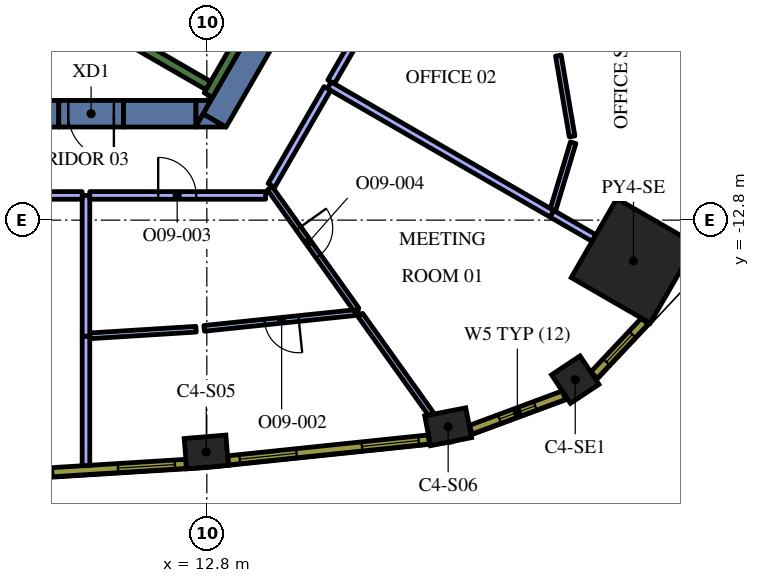
"""IFC4 building model, lengths in metres.
Left out: names, types, materials, properties, quantities, classifications, styles, units other than length and angle.
Written with IfcOpenShell. Run it as: python <this file> out.ifc"""

import sys

from ifc_helpers import new_model, si_unit, direction, frame, frame_2d, origin, origin_2d, place, context, subcontext, project, spatial, polyline, rectangle, outline, extrude, element, fill, save


model = new_model("IFC4")
c1 = context("Model", 3, precision=1e-05, world=origin(), true_north=direction((0.0, 1.0)))
c2 = subcontext(c1, "Body", "Model", "MODEL_VIEW")
j1 = project(units=[si_unit("LENGTHUNIT", "METRE"), si_unit("PLANEANGLEUNIT", "RADIAN")], contexts=[c1])
p1 = place(None, origin())
s1 = spatial("IfcSite", under=j1, at=p1, CompositionType="ELEMENT")
p2 = place(p1, origin())
s2 = spatial("IfcBuilding", under=s1, at=p2, CompositionType="ELEMENT")
p3 = place(p2, frame((0.0, 0.0, 247.8)))
s3 = spatial("IfcBuildingStorey", under=s2, at=p3, CompositionType="ELEMENT", Elevation=247.8)
p4 = place(p3, frame((24.027, -13.872, 0.0), z_axis=(0.0, 0.0, 1.0), x_axis=(0.866025403784, -0.5, 0.0)))
e1 = element("IfcColumn", 1, at=p4, inside=s3, PredefinedType="COLUMN", context=c2, shape_type="SweptSolid", body=[
    extrude(rectangle(XDim=2.4, YDim=2.4, at=origin_2d()), origin(), (0.0, 0.0, 1.0), 4.2),
])
for number, where, z_axis, x_axis in (
    (2, (12.785, -18.9, 0.0), (0.0, 0.0, 1.0), (0.997, 0.083, 0.0)),
    (3, (19.15, -18.237, 0.0), (0.0, 0.0, 1.0), (0.981, 0.192, 0.0)),
):
    element("IfcColumn", number, at=place(p3, frame(where, z_axis=z_axis, x_axis=x_axis)), inside=s3, PredefinedType="COLUMN", context=c2, shape_type="SweptSolid", body=[
        extrude(rectangle(XDim=1.1, YDim=0.8, at=origin_2d()), origin(), (0.0, 0.0, 1.0), 4.2),
    ])
p5 = place(p3, frame((22.494, -16.997, 0.0), z_axis=(0.0, 0.0, 1.0), x_axis=(0.833238868178, 0.552913183563, 0.0)))
e4 = element("IfcColumn", 4, at=p5, inside=s3, PredefinedType="COLUMN", context=c2, shape_type="SweptSolid", body=[
    extrude(rectangle(XDim=0.9, YDim=0.9, at=origin_2d()), origin(), (0.0, 0.0, 1.0), 4.2),
])
p6 = place(p3, frame((13.003, -10.179, 0.0), z_axis=(0.0, 0.0, 1.0), x_axis=(0.499972675833, 0.866041178825, 0.0)))
e5 = element("IfcWall", 5, at=p6, inside=s3, PredefinedType="SOLIDWALL", context=c2, shape_type="SweptSolid", body=[
    extrude(rectangle(XDim=3.829, YDim=0.7, at=frame_2d((1.915, 0.0))), origin(), (0.0, 0.0, 1.0), 4.2),
])
p7 = place(p3, origin())
e6 = element("IfcWall", 6, at=p7, inside=s3, PredefinedType="SOLIDWALL", context=c2, shape_type="SweptSolid", body=[
    extrude(outline(polyline([(12.5, -10.35), (12.698, -10.005), (13.296, -10.35), (12.5, -10.35)])), origin(), (0.0, 0.0, 1.0), 4.2),
])
p8 = place(p3, frame((10.604, -10.0, 0.0), z_axis=(0.0, 0.0, 1.0), x_axis=(1.0, 0.0, 0.0)))
e7 = element("IfcWall", 7, at=p8, inside=s3, PredefinedType="SOLIDWALL", context=c2, shape_type="SweptSolid", body=[
    extrude(rectangle(XDim=1.909, YDim=0.7, at=frame_2d((0.955, 0.0))), origin(), (0.0, 0.0, 1.0), 4.2),
])
e8 = element("IfcWall", 8, at=p7, inside=s3, PredefinedType="SOLIDWALL", context=c2, shape_type="SweptSolid", body=[
    extrude(outline(polyline([(12.904, -9.65), (12.516, -10.322), (12.516, -9.65), (12.904, -9.65)])), origin(), (0.0, 0.0, 1.0), 4.2),
])
p9 = place(p3, frame((8.904, -10.0, 0.0), z_axis=(0.0, 0.0, 1.0), x_axis=(-1.0, 0.0, 0.0)))
e9 = element("IfcWall", 9, at=p9, inside=s3, PredefinedType="SOLIDWALL", context=c2, shape_type="SweptSolid", body=[
    extrude(rectangle(XDim=22.226, YDim=0.7, at=frame_2d((11.113, 0.0))), origin(), (0.0, 0.0, 1.0), 4.2),
])
p10 = place(p3, frame((12.84, -9.511, 0.0), z_axis=(0.0, 0.0, 1.0), x_axis=(0.500048121057, 0.865997619297, 0.0)))
e10 = element("IfcWall", 10, at=p10, inside=s3, PredefinedType="SOLIDWALL", context=c2, shape_type="SweptSolid", body=[
    extrude(rectangle(XDim=3.634, YDim=0.25, at=frame_2d((1.817, 0.0))), origin(), (0.0, 0.0, 1.0), 4.2),
])
p11 = place(p3, frame((12.84, -9.261, 0.0), z_axis=(0.0, 0.0, 1.0), x_axis=(-0.866013990052, 0.500019768644, 0.0)))
e11 = element("IfcWall", 11, at=p11, inside=s3, PredefinedType="SOLIDWALL", context=c2, shape_type="SweptSolid", body=[
    extrude(rectangle(XDim=6.8, YDim=0.25, at=frame_2d((3.4, 0.0))), origin(), (0.0, 0.0, 1.0), 4.2),
])
p12 = place(p3, frame((10.604, -10.0, 0.0), z_axis=(0.0, 0.0, 1.0), x_axis=(-1.0, 0.0, 0.0)))
e12 = element("IfcWall", 12, at=p12, inside=s3, PredefinedType="SOLIDWALL", context=c2, shape_type="SweptSolid", body=[
    extrude(rectangle(XDim=1.7, YDim=0.7, at=frame_2d((0.85, 0.0))), origin(), (0.0, 0.0, 1.0), 4.2),
])
p13 = place(p12, frame((0.25, 0.0, 0.0)))
e13 = element("IfcOpeningElement", 13, at=p13, cuts=e12, PredefinedType="OPENING", context=c2, shape_type="SweptSolid", body=[
    extrude(rectangle(XDim=1.2, YDim=2.1, at=frame_2d((0.6, 1.05))), frame((0.0, 0.36, 0.0), z_axis=(0.0, -1.0, 0.0), x_axis=(1.0, 0.0, 0.0)), (0.0, 0.0, 1.0), 0.72),
])
p14 = place(p3, frame((9.62, -15.847, 0.0), z_axis=(0.0, 0.0, 1.0), x_axis=(0.0, -1.0, 0.0)))
e14 = element("IfcWall", 14, at=p14, inside=s3, PredefinedType="PARTITIONING", context=c2, shape_type="SweptSolid", body=[
    extrude(rectangle(XDim=3.411, YDim=0.2, at=frame_2d((1.705, 0.0))), origin(), (0.0, 0.0, 1.0), 3.45),
])
p15 = place(p3, frame((9.62, -12.15, 0.0), z_axis=(0.0, 0.0, 1.0), x_axis=(0.0, -1.0, 0.0)))
e15 = element("IfcWall", 15, at=p15, inside=s3, PredefinedType="PARTITIONING", context=c2, shape_type="SweptSolid", body=[
    extrude(rectangle(XDim=3.705, YDim=0.2, at=frame_2d((1.853, 0.0))), origin(), (0.0, 0.0, 1.0), 3.45),
])
p16 = place(p3, frame((7.03, -12.15, 0.0), z_axis=(0.0, 0.0, 1.0), x_axis=(1.0, 0.0, 0.0)))
e16 = element("IfcWall", 16, at=p16, inside=s3, PredefinedType="PARTITIONING", context=c2, shape_type="SweptSolid", body=[
    extrude(rectangle(XDim=2.49, YDim=0.2, at=frame_2d((1.245, 0.0))), origin(), (0.0, 0.0, 1.0), 3.45),
])
p17 = place(p3, frame((9.72, -15.844, 0.0), z_axis=(0.0, 0.0, 1.0), x_axis=(0.998063411199, 0.062204720286, 0.0)))
e17 = element("IfcWall", 17, at=p17, inside=s3, PredefinedType="PARTITIONING", context=c2, shape_type="SweptSolid", body=[
    extrude(rectangle(XDim=2.802, YDim=0.15, at=frame_2d((1.401, 0.0))), origin(), (0.0, 0.0, 1.0), 3.45),
])
p18 = place(p3, frame((16.788, -15.225, 0.0), z_axis=(0.0, 0.0, 1.0), x_axis=(-0.994622518406, -0.103566625322, 0.0)))
e18 = element("IfcWall", 18, at=p18, inside=s3, PredefinedType="PARTITIONING", context=c2, shape_type="SweptSolid", body=[
    extrude(rectangle(XDim=4.081, YDim=0.15, at=frame_2d((2.04, 0.0))), origin(), (0.0, 0.0, 1.0), 3.45),
])
p19 = place(p18, frame((1.581, 0.0, 0.0)))
e19 = element("IfcOpeningElement", 19, at=p19, cuts=e18, PredefinedType="OPENING", context=c2, shape_type="SweptSolid", body=[
    extrude(rectangle(XDim=0.9, YDim=2.1, at=frame_2d((0.45, 1.05))), frame((0.0, 0.085, 0.0), z_axis=(0.0, -1.0, 0.0), x_axis=(1.0, 0.0, 0.0)), (0.0, 0.0, 1.0), 0.17),
])
p20 = place(p3, frame((16.838, -15.295, 0.0), z_axis=(0.0, 0.0, 1.0), x_axis=(0.581015803238, -0.813892275666, 0.0)))
e20 = element("IfcWall", 20, at=p20, inside=s3, PredefinedType="PARTITIONING", context=c2, shape_type="SweptSolid", body=[
    extrude(rectangle(XDim=3.219, YDim=0.15, at=frame_2d((1.61, 0.0))), origin(), (0.0, 0.0, 1.0), 3.45),
])
p21 = place(p3, frame((14.457, -11.96, 0.0), z_axis=(0.0, 0.0, 1.0), x_axis=(0.581049944662, -0.81386790194, 0.0)))
e21 = element("IfcWall", 21, at=p21, inside=s3, PredefinedType="PARTITIONING", context=c2, shape_type="SweptSolid", body=[
    extrude(rectangle(XDim=3.926, YDim=0.15, at=frame_2d((1.963, 0.0))), origin(), (0.0, 0.0, 1.0), 3.45),
])
p22 = place(p21, frame((1.3, 0.0, 0.0)))
e22 = element("IfcOpeningElement", 22, at=p22, cuts=e21, PredefinedType="OPENING", context=c2, shape_type="SweptSolid", body=[
    extrude(rectangle(XDim=0.9, YDim=2.1, at=frame_2d((0.45, 1.05))), frame((0.0, 0.085, 0.0), z_axis=(0.0, -1.0, 0.0), x_axis=(1.0, 0.0, 0.0)), (0.0, 0.0, 1.0), 0.17),
])
p23 = place(p3, frame((9.72, -12.15, 0.0), z_axis=(0.0, 0.0, 1.0), x_axis=(1.0, 0.0, 0.0)))
e23 = element("IfcWall", 23, at=p23, inside=s3, PredefinedType="PARTITIONING", context=c2, shape_type="SweptSolid", body=[
    extrude(rectangle(XDim=4.627, YDim=0.2, at=frame_2d((2.314, 0.0))), origin(), (0.0, 0.0, 1.0), 3.45),
])
p24 = place(p23, frame((1.8, 0.0, 0.0)))
e24 = element("IfcOpeningElement", 24, at=p24, cuts=e23, PredefinedType="OPENING", context=c2, shape_type="SweptSolid", body=[
    extrude(rectangle(XDim=1.0, YDim=2.1, at=frame_2d((0.5, 1.05))), frame((0.0, 0.11, 0.0), z_axis=(0.0, -1.0, 0.0), x_axis=(1.0, 0.0, 0.0)), (0.0, 0.0, 1.0), 0.22),
])
p25 = place(p3, frame((21.873, -12.628, 0.0), z_axis=(0.0, 0.0, 1.0), x_axis=(0.866052988967, -0.499952218018, 0.0)))
e25 = element("IfcWall", 25, at=p25, inside=s3, PredefinedType="PARTITIONING", context=c2, shape_type="SweptSolid", body=[
    extrude(rectangle(XDim=1.288, YDim=0.2, at=frame_2d((0.644, 0.0))), origin(), (0.0, 0.0, 1.0), 3.45),
])
p26 = place(p3, frame((16.021, -9.25, 0.0), z_axis=(0.0, 0.0, 1.0), x_axis=(0.86602692059, -0.499997372806, 0.0)))
e26 = element("IfcWall", 26, at=p26, inside=s3, PredefinedType="PARTITIONING", context=c2, shape_type="SweptSolid", body=[
    extrude(rectangle(XDim=6.765, YDim=0.2, at=frame_2d((3.382, 0.0))), origin(), (0.0, 0.0, 1.0), 3.45),
])
p27 = place(p3, frame((14.498, -11.888, 0.0), z_axis=(0.0, 0.0, 1.0), x_axis=(0.500006981563, 0.86602137294, 0.0)))
e27 = element("IfcWall", 27, at=p27, inside=s3, PredefinedType="PARTITIONING", context=c2, shape_type="SweptSolid", body=[
    extrude(rectangle(XDim=2.946, YDim=0.2, at=frame_2d((1.473, 0.0))), origin(), (0.0, 0.0, 1.0), 3.45),
])
p28 = place(p3, frame((21.906, -12.532, 0.0), z_axis=(0.0, 0.0, 1.0), x_axis=(0.288789848591, 0.957392512688, 0.0)))
e28 = element("IfcWall", 28, at=p28, inside=s3, PredefinedType="PARTITIONING", context=c2, shape_type="SweptSolid", body=[
    extrude(rectangle(XDim=1.848, YDim=0.15, at=frame_2d((0.924, 0.0))), origin(), (0.0, 0.0, 1.0), 3.45),
])
p29 = place(p3, frame((22.412, -10.597, 0.0), z_axis=(0.0, 0.0, 1.0), x_axis=(-0.167612004459, 0.985853039738, 0.0)))
e29 = element("IfcWall", 29, at=p29, inside=s3, PredefinedType="PARTITIONING", context=c2, shape_type="SweptSolid", body=[
    extrude(rectangle(XDim=2.156, YDim=0.15, at=frame_2d((1.078, 0.0))), origin(), (0.0, 0.0, 1.0), 3.45),
])
p30 = place(p3, frame((16.072, -9.163, 0.0), z_axis=(0.0, 0.0, 1.0), x_axis=(0.500010870188, 0.866019127788, 0.0)))
e30 = element("IfcWall", 30, at=p30, inside=s3, PredefinedType="PARTITIONING", context=c2, shape_type="SweptSolid", body=[
    extrude(rectangle(XDim=3.249, YDim=0.2, at=frame_2d((1.624, 0.0))), origin(), (0.0, 0.0, 1.0), 3.45),
])
p31 = place(p3, frame((6.965, -19.543, 0.0), z_axis=(0.0, 0.0, 1.0), x_axis=(0.9980633213, 0.062206162685, 0.0)))
e31 = element("IfcWall", 31, at=p31, inside=s3, PredefinedType="SOLIDWALL", context=c2, shape_type="SweptSolid", body=[
    extrude(rectangle(XDim=5.298, YDim=0.24, at=frame_2d((2.649, 0.0))), origin(), (0.0, 0.0, 1.0), 3.95),
])
p32 = place(p31, frame((0.295, 0.0, 0.9)))
e32 = element("IfcOpeningElement", 32, at=p32, cuts=e31, PredefinedType="OPENING", context=c2, shape_type="SweptSolid", body=[
    extrude(rectangle(XDim=1.5, YDim=2.55, at=frame_2d((0.75, 1.275))), frame((0.0, 0.13, 0.0), z_axis=(0.0, -1.0, 0.0), x_axis=(1.0, 0.0, 0.0)), (0.0, 0.0, 1.0), 0.26),
])
p33 = place(p31, frame((3.504, 0.0, 0.9)))
e33 = element("IfcOpeningElement", 33, at=p33, cuts=e31, PredefinedType="OPENING", context=c2, shape_type="SweptSolid", body=[
    extrude(rectangle(XDim=1.5, YDim=2.55, at=frame_2d((0.75, 1.275))), frame((0.0, 0.13, 0.0), z_axis=(0.0, -1.0, 0.0), x_axis=(1.0, 0.0, 0.0)), (0.0, 0.0, 1.0), 0.26),
])
p34 = place(p3, frame((13.362, -19.121, 0.0), z_axis=(0.0, 0.0, 1.0), x_axis=(0.994621961215, 0.103571976272, 0.0)))
e34 = element("IfcWall", 34, at=p34, inside=s3, PredefinedType="SOLIDWALL", context=c2, shape_type="SweptSolid", body=[
    extrude(rectangle(XDim=5.311, YDim=0.24, at=frame_2d((2.655, 0.0))), origin(), (0.0, 0.0, 1.0), 3.95),
])
p35 = place(p34, frame((0.306, 0.0, 0.9)))
e35 = element("IfcOpeningElement", 35, at=p35, cuts=e34, PredefinedType="OPENING", context=c2, shape_type="SweptSolid", body=[
    extrude(rectangle(XDim=1.5, YDim=2.55, at=frame_2d((0.75, 1.275))), frame((0.0, 0.13, 0.0), z_axis=(0.0, -1.0, 0.0), x_axis=(1.0, 0.0, 0.0)), (0.0, 0.0, 1.0), 0.26),
])
p36 = place(p34, frame((3.539, 0.0, 0.9)))
e36 = element("IfcOpeningElement", 36, at=p36, cuts=e34, PredefinedType="OPENING", context=c2, shape_type="SweptSolid", body=[
    extrude(rectangle(XDim=1.5, YDim=2.55, at=frame_2d((0.75, 1.275))), frame((0.0, 0.13, 0.0), z_axis=(0.0, -1.0, 0.0), x_axis=(1.0, 0.0, 0.0)), (0.0, 0.0, 1.0), 0.26),
])
p37 = place(p3, frame((19.748, -18.314, 0.0), z_axis=(0.0, 0.0, 1.0), x_axis=(0.937569171184, 0.347798863203, 0.0)))
e37 = element("IfcWall", 37, at=p37, inside=s3, PredefinedType="SOLIDWALL", context=c2, shape_type="SweptSolid", body=[
    extrude(rectangle(XDim=2.609, YDim=0.24, at=frame_2d((1.305, 0.0))), origin(), (0.0, 0.0, 1.0), 3.95),
])
p38 = place(p37, frame((0.805, 0.0, 0.9)))
e38 = element("IfcOpeningElement", 38, at=p38, cuts=e37, PredefinedType="OPENING", context=c2, shape_type="SweptSolid", body=[
    extrude(rectangle(XDim=1.0, YDim=2.55, at=frame_2d((0.5, 1.275))), frame((0.0, 0.13, 0.0), z_axis=(0.0, -1.0, 0.0), x_axis=(1.0, 0.0, 0.0)), (0.0, 0.0, 1.0), 0.26),
])
p39 = place(p3, frame((22.989, -16.879, 0.0), z_axis=(0.0, 0.0, 1.0), x_axis=(0.684770274166, 0.728758994194, 0.0)))
e39 = element("IfcWall", 39, at=p39, inside=s3, PredefinedType="SOLIDWALL", context=c2, shape_type="SweptSolid", body=[
    extrude(rectangle(XDim=1.948, YDim=0.24, at=frame_2d((0.974, 0.0))), origin(), (0.0, 0.0, 1.0), 3.95),
])
p40 = place(p39, frame((0.474, 0.0, 0.9)))
e40 = element("IfcOpeningElement", 40, at=p40, cuts=e39, PredefinedType="OPENING", context=c2, shape_type="SweptSolid", body=[
    extrude(rectangle(XDim=1.0, YDim=2.55, at=frame_2d((0.5, 1.275))), frame((0.0, 0.13, 0.0), z_axis=(0.0, -1.0, 0.0), x_axis=(1.0, 0.0, 0.0)), (0.0, 0.0, 1.0), 0.26),
])
p41 = place(p13, origin())
e41 = element("IfcDoor", 41, at=p41, inside=s3, OperationType="SINGLE_SWING_LEFT", PredefinedType="DOOR", context=c2, shape_type="SweptSolid", body=[
    extrude(rectangle(XDim=1.2, YDim=2.1, at=frame_2d((0.6, 1.05))), frame((0.0, 0.025, 0.0), z_axis=(0.0, -1.0, 0.0), x_axis=(1.0, 0.0, 0.0)), (0.0, 0.0, 1.0), 0.05),
])
fill(e13, e41)
p42 = place(p19, origin())
e42 = element("IfcDoor", 42, at=p42, inside=s3, OperationType="SINGLE_SWING_LEFT", PredefinedType="DOOR", context=c2, shape_type="SweptSolid", body=[
    extrude(rectangle(XDim=0.9, YDim=2.1, at=frame_2d((0.45, 1.05))), frame((0.0, 0.025, 0.0), z_axis=(0.0, -1.0, 0.0), x_axis=(1.0, 0.0, 0.0)), (0.0, 0.0, 1.0), 0.05),
])
fill(e19, e42)
p43 = place(p24, origin())
e43 = element("IfcDoor", 43, at=p43, inside=s3, OperationType="SINGLE_SWING_LEFT", PredefinedType="DOOR", context=c2, shape_type="SweptSolid", body=[
    extrude(rectangle(XDim=1.0, YDim=2.1, at=frame_2d((0.5, 1.05))), frame((0.0, 0.025, 0.0), z_axis=(0.0, -1.0, 0.0), x_axis=(1.0, 0.0, 0.0)), (0.0, 0.0, 1.0), 0.05),
])
fill(e24, e43)
p44 = place(p22, origin())
e44 = element("IfcDoor", 44, at=p44, inside=s3, OperationType="SINGLE_SWING_LEFT", PredefinedType="DOOR", context=c2, shape_type="SweptSolid", body=[
    extrude(rectangle(XDim=0.9, YDim=2.1, at=frame_2d((0.45, 1.05))), frame((0.0, 0.025, 0.0), z_axis=(0.0, -1.0, 0.0), x_axis=(1.0, 0.0, 0.0)), (0.0, 0.0, 1.0), 0.05),
])
fill(e22, e44)
p45 = place(p32, origin())
e45 = element("IfcWindow", 45, at=p45, inside=s3, PartitioningType="SINGLE_PANEL", PredefinedType="WINDOW", context=c2, shape_type="SweptSolid", body=[
    extrude(rectangle(XDim=1.5, YDim=2.55, at=frame_2d((0.75, 1.275))), frame((0.0, 0.04, 0.0), z_axis=(0.0, -1.0, 0.0), x_axis=(1.0, 0.0, 0.0)), (0.0, 0.0, 1.0), 0.06),
])
fill(e32, e45)
p46 = place(p33, origin())
e46 = element("IfcWindow", 46, at=p46, inside=s3, PartitioningType="SINGLE_PANEL", PredefinedType="WINDOW", context=c2, shape_type="SweptSolid", body=[
    extrude(rectangle(XDim=1.5, YDim=2.55, at=frame_2d((0.75, 1.275))), frame((0.0, 0.04, 0.0), z_axis=(0.0, -1.0, 0.0), x_axis=(1.0, 0.0, 0.0)), (0.0, 0.0, 1.0), 0.06),
])
fill(e33, e46)
p47 = place(p35, origin())
e47 = element("IfcWindow", 47, at=p47, inside=s3, PartitioningType="SINGLE_PANEL", PredefinedType="WINDOW", context=c2, shape_type="SweptSolid", body=[
    extrude(rectangle(XDim=1.5, YDim=2.55, at=frame_2d((0.75, 1.275))), frame((0.0, 0.04, 0.0), z_axis=(0.0, -1.0, 0.0), x_axis=(1.0, 0.0, 0.0)), (0.0, 0.0, 1.0), 0.06),
])
fill(e35, e47)
p48 = place(p36, origin())
e48 = element("IfcWindow", 48, at=p48, inside=s3, PartitioningType="SINGLE_PANEL", PredefinedType="WINDOW", context=c2, shape_type="SweptSolid", body=[
    extrude(rectangle(XDim=1.5, YDim=2.55, at=frame_2d((0.75, 1.275))), frame((0.0, 0.04, 0.0), z_axis=(0.0, -1.0, 0.0), x_axis=(1.0, 0.0, 0.0)), (0.0, 0.0, 1.0), 0.06),
])
fill(e36, e48)
p49 = place(p38, origin())
e49 = element("IfcWindow", 49, at=p49, inside=s3, PartitioningType="SINGLE_PANEL", PredefinedType="WINDOW", context=c2, shape_type="SweptSolid", body=[
    extrude(rectangle(XDim=1.0, YDim=2.55, at=frame_2d((0.5, 1.275))), frame((0.0, 0.04, 0.0), z_axis=(0.0, -1.0, 0.0), x_axis=(1.0, 0.0, 0.0)), (0.0, 0.0, 1.0), 0.06),
])
fill(e38, e49)
p50 = place(p40, origin())
e50 = element("IfcWindow", 50, at=p50, inside=s3, PartitioningType="SINGLE_PANEL", PredefinedType="WINDOW", context=c2, shape_type="SweptSolid", body=[
    extrude(rectangle(XDim=1.0, YDim=2.55, at=frame_2d((0.5, 1.275))), frame((0.0, 0.04, 0.0), z_axis=(0.0, -1.0, 0.0), x_axis=(1.0, 0.0, 0.0)), (0.0, 0.0, 1.0), 0.06),
])
fill(e40, e50)
save(model, sys.argv[1])
